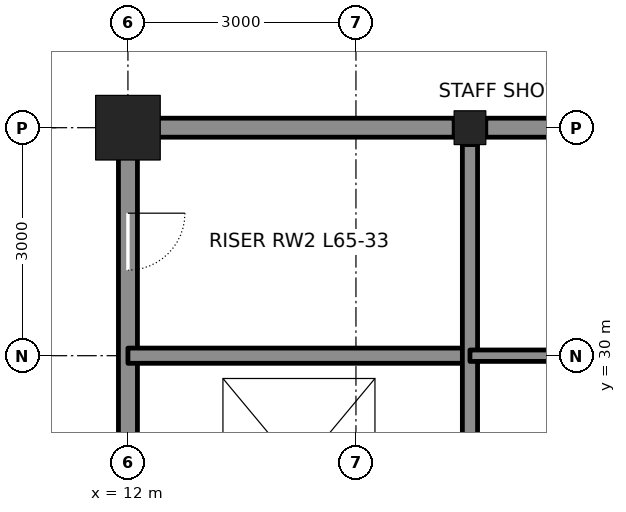
"""IFC4 building model, lengths in metres.
Left out: names, types, materials, properties, quantities, classifications, styles, units other than length and angle.
Written with IfcOpenShell. Run it as: python <this file> out.ifc"""

import sys

from ifc_helpers import new_model, si_unit, direction, frame, frame_2d, origin, origin_2d, place, context, subcontext, project, spatial, rectangle, hollow_rectangle, i_section, extrude, element, fill, save


model = new_model("IFC4")
c1 = context("Model", 3, precision=1e-05, world=origin(), true_north=direction((0.0, 1.0)))
c2 = subcontext(c1, "Body", "Model", "MODEL_VIEW")
j1 = project(units=[si_unit("LENGTHUNIT", "METRE"), si_unit("PLANEANGLEUNIT", "RADIAN")], contexts=[c1])
p1 = place(None, origin())
s1 = spatial("IfcSite", under=j1, at=p1, CompositionType="ELEMENT")
p2 = place(p1, origin())
s2 = spatial("IfcBuilding", under=s1, at=p2, CompositionType="ELEMENT")
p3 = place(p2, frame((0.0, 0.0, 291.6)))
s3 = spatial("IfcBuildingStorey", under=s2, at=p3, CompositionType="ELEMENT", Elevation=291.6)
p4 = place(p3, frame((12.0, 33.0, 0.0), z_axis=(0.0, 0.0, 1.0), x_axis=(1.0, 0.0, 0.0)))
e1 = element("IfcColumn", 1, at=p4, inside=s3, PredefinedType="COLUMN", context=c2, shape_type="SweptSolid", body=[
    extrude(hollow_rectangle(XDim=0.85, YDim=0.85, WallThickness=0.085, at=origin_2d()), origin(), (0.0, 0.0, 1.0), 4.2),
])
p5 = place(p3, frame((16.5, 33.0, 0.0), z_axis=(0.0, 0.0, 1.0), x_axis=(1.0, 0.0, 0.0)))
e2 = element("IfcColumn", 2, at=p5, inside=s3, PredefinedType="COLUMN", context=c2, shape_type="SweptSolid", body=[
    extrude(i_section(OverallWidth=0.417, OverallDepth=0.445, WebThickness=0.039, FlangeThickness=0.063, at=origin_2d()), origin(), (0.0, 0.0, 1.0), 4.2),
])
p6 = place(p3, frame((12.0, 24.222, 0.0), z_axis=(0.0, 0.0, 1.0), x_axis=(0.0, 1.0, 0.0)))
e3 = element("IfcWall", 3, at=p6, inside=s3, PredefinedType="SOLIDWALL", context=c2, shape_type="SweptSolid", body=[
    extrude(rectangle(XDim=8.528, YDim=0.25, at=frame_2d((4.264, 0.0))), origin(), (0.0, 0.0, 1.0), 3.113),
])
p7 = place(p6, frame((0.678, 0.0, 0.0)))
e4 = element("IfcOpeningElement", 4, at=p7, cuts=e3, PredefinedType="OPENING", context=c2, shape_type="SweptSolid", body=[
    extrude(rectangle(XDim=1.2, YDim=2.1, at=frame_2d((0.6, 1.05))), frame((0.0, 0.135, 0.0), z_axis=(0.0, -1.0, 0.0), x_axis=(1.0, 0.0, 0.0)), (0.0, 0.0, 1.0), 0.27),
])
p8 = place(p6, frame((6.903, 0.0, 0.0)))
e5 = element("IfcOpeningElement", 5, at=p8, cuts=e3, PredefinedType="OPENING", context=c2, shape_type="SweptSolid", body=[
    extrude(rectangle(XDim=0.75, YDim=2.1, at=frame_2d((0.375, 1.05))), frame((0.0, 0.135, 0.0), z_axis=(0.0, -1.0, 0.0), x_axis=(1.0, 0.0, 0.0)), (0.0, 0.0, 1.0), 0.27),
])
p9 = place(p3, frame((12.0, 30.0, 0.0), z_axis=(0.0, 0.0, 1.0), x_axis=(1.0, 0.0, 0.0)))
e6 = element("IfcWall", 6, at=p9, inside=s3, PredefinedType="SOLIDWALL", context=c2, shape_type="SweptSolid", body=[
    extrude(rectangle(XDim=4.5, YDim=0.2, at=frame_2d((2.25, 0.0))), origin(), (0.0, 0.0, 1.0), 4.04),
])
p10 = place(p3, frame((12.25, 33.0, 0.0), z_axis=(0.0, 0.0, 1.0), x_axis=(1.0, 0.0, 0.0)))
e7 = element("IfcWall", 7, at=p10, inside=s3, PredefinedType="SOLIDWALL", context=c2, shape_type="SweptSolid", body=[
    extrude(rectangle(XDim=4.042, YDim=0.25, at=frame_2d((2.021, 0.0))), origin(), (0.0, 0.0, 1.0), 3.181),
])
p11 = place(p3, frame((16.708, 33.0, 0.0), z_axis=(0.0, 0.0, 1.0), x_axis=(1.0, 0.0, 0.0)))
e8 = element("IfcWall", 8, at=p11, inside=s3, PredefinedType="SOLIDWALL", context=c2, shape_type="SweptSolid", body=[
    extrude(rectangle(XDim=2.583, YDim=0.25, at=frame_2d((1.292, 0.0))), origin(), (0.0, 0.0, 1.0), 3.181),
])
p12 = place(p3, frame((16.5, 24.222, 0.0), z_axis=(0.0, 0.0, 1.0), x_axis=(0.0, 1.0, 0.0)))
e9 = element("IfcWall", 9, at=p12, inside=s3, PredefinedType="SOLIDWALL", context=c2, shape_type="SweptSolid", body=[
    extrude(rectangle(XDim=8.555, YDim=0.2, at=frame_2d((4.278, 0.0))), origin(), (0.0, 0.0, 1.0), 3.113),
])
p13 = place(p3, frame((16.5, 30.0, 0.0), z_axis=(0.0, 0.0, 1.0), x_axis=(1.0, 0.0, 0.0)))
e10 = element("IfcWall", 10, at=p13, inside=s3, PredefinedType="PARTITIONING", context=c2, shape_type="SweptSolid", body=[
    extrude(rectangle(XDim=3.0, YDim=0.15, at=frame_2d((1.5, 0.0))), origin(), (0.0, 0.0, 1.0), 4.04),
])
p14 = place(p8, frame((0.75, 0.0, 0.0), z_axis=(0.0, 0.0, 1.0), x_axis=(-1.0, 0.0, 0.0)))
e11 = element("IfcDoor", 11, at=p14, inside=s3, OperationType="SINGLE_SWING_LEFT", PredefinedType="DOOR", context=c2, shape_type="SweptSolid", body=[
    extrude(rectangle(XDim=0.75, YDim=2.1, at=frame_2d((0.375, 1.05))), frame((0.0, 0.025, 0.0), z_axis=(0.0, -1.0, 0.0), x_axis=(1.0, 0.0, 0.0)), (0.0, 0.0, 1.0), 0.05),
])
fill(e5, e11)
save(model, sys.argv[1])
